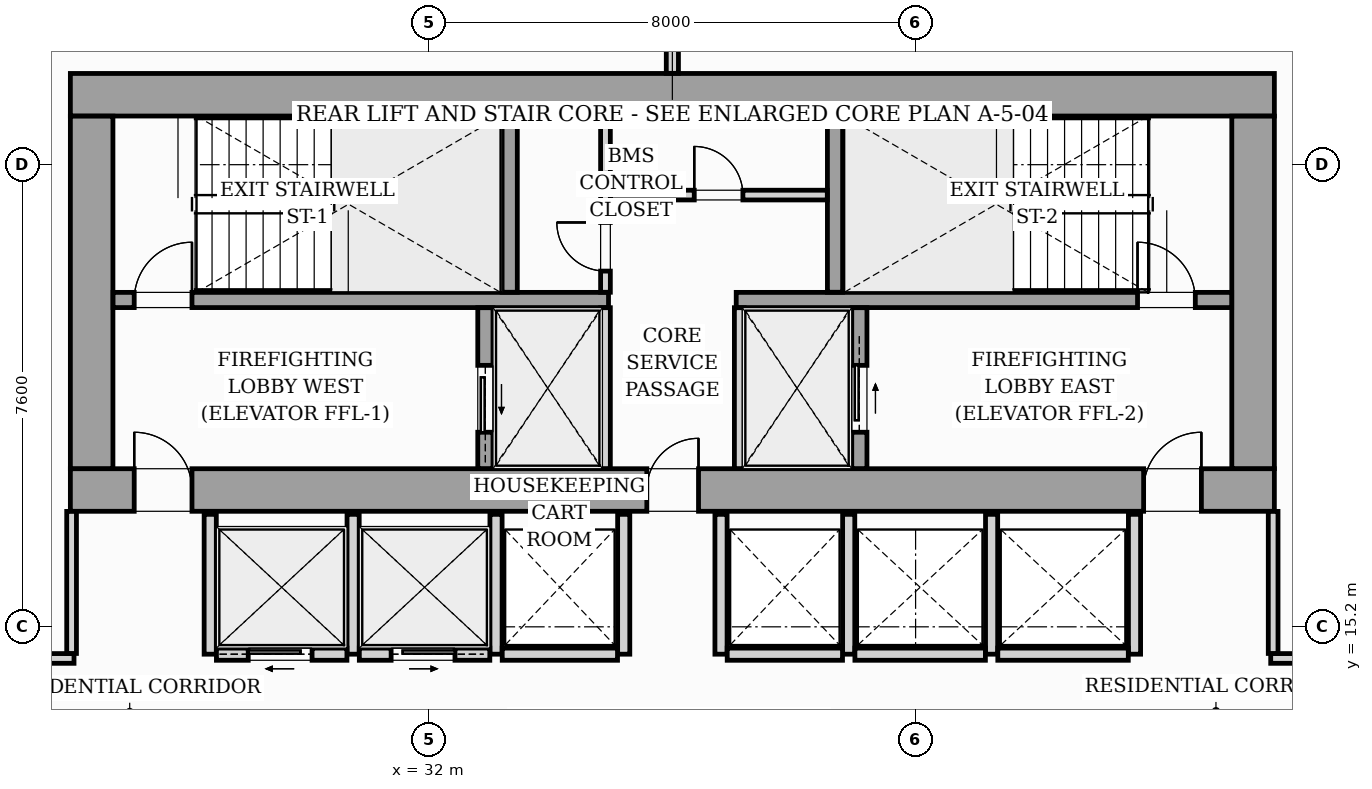
"""IFC4 building model, lengths in metres.
Left out: names, types, materials, properties, quantities, classifications, styles, units other than length and angle.
Written with IfcOpenShell. Run it as: python <this file> out.ifc"""

import sys

from ifc_helpers import new_model, si_unit, direction, frame, frame_2d, origin, origin_2d, place, context, subcontext, project, spatial, rectangle, i_section, extrude, source, transform, mapped, element, fill, save


model = new_model("IFC4")
c1 = context("Model", 3, precision=1e-05, world=origin(), true_north=direction((0.0, 1.0)))
c2 = subcontext(c1, "Body", "Model", "MODEL_VIEW")
j1 = project(units=[si_unit("LENGTHUNIT", "METRE"), si_unit("PLANEANGLEUNIT", "RADIAN")], contexts=[c1])
p1 = place(None, origin())
s1 = spatial("IfcSite", under=j1, at=p1, CompositionType="ELEMENT")
p2 = place(p1, origin())
s2 = spatial("IfcBuilding", under=s1, at=p2, CompositionType="ELEMENT")
p3 = place(p2, frame((0.0, 0.0, 90.6)))
s3 = spatial("IfcBuildingStorey", under=s2, at=p3, CompositionType="ELEMENT", Elevation=90.6)
m1 = source(origin(), c2, "Body", "SweptSolid", [
    extrude(i_section(OverallWidth=0.427, OverallDepth=0.483, WebThickness=0.051, FlangeThickness=0.082, FilletRadius=0.018, at=origin_2d()), origin(), (0.0, 0.0, 1.0), 3.196),
])
for number, where, z_axis, x_axis in (
    (1, (26.4, 17.4, 0.002), (0.0, 0.0, 1.0), (1.0, 0.0, 0.0)),
    (2, (33.12, 17.4, 0.002), (0.0, 0.0, 1.0), (1.0, 0.0, 0.0)),
    (3, (38.88, 17.4, 0.002), (0.0, 0.0, 1.0), (1.0, 0.0, 0.0)),
    (4, (45.6, 17.4, 0.002), (0.0, 0.0, 1.0), (1.0, 0.0, 0.0)),
    (5, (26.4, 24.0, 0.002), (0.0, 0.0, 1.0), (1.0, 0.0, 0.0)),
    (6, (33.12, 24.0, 0.002), (0.0, 0.0, 1.0), (1.0, 0.0, 0.0)),
    (7, (38.88, 24.0, 0.002), (0.0, 0.0, 1.0), (1.0, 0.0, 0.0)),
    (8, (45.6, 24.0, 0.002), (0.0, 0.0, 1.0), (1.0, 0.0, 0.0)),
):
    element("IfcColumn", number, at=place(p3, frame(where, z_axis=z_axis, x_axis=x_axis)), inside=s3, PredefinedType="PILASTER", context=c2, shape_type="MappedRepresentation", body=[
        mapped(m1, transform((0.0, 0.0, 0.0), scale=1.0)),
    ])
p4 = place(p3, frame((11.08, 23.508, 0.0), z_axis=(0.0, 0.0, 1.0), x_axis=(0.995396638587, 0.095841180552, 0.0)))
e9 = element("IfcWall", 9, at=p4, inside=s3, PredefinedType="STANDARD", context=c2, shape_type="SweptSolid", body=[
    extrude(rectangle(XDim=19.11, YDim=0.26, at=frame_2d((9.555, 0.0))), origin(), (0.0, 0.0, 1.0), 2.94),
])
p5 = place(p4, frame((8.514, 0.0, 0.0)))
e10 = element("IfcOpeningElement", 10, at=p5, cuts=e9, PredefinedType="OPENING", context=c2, shape_type="SweptSolid", body=[
    extrude(rectangle(XDim=1.8, YDim=2.06, at=frame_2d((0.9, 1.03))), frame((0.0, 0.14, 0.0), z_axis=(0.0, -1.0, 0.0), x_axis=(1.0, 0.0, 0.0)), (0.0, 0.0, 1.0), 0.28),
])
p6 = place(p4, frame((2.05, 0.0, 0.65)))
e11 = element("IfcOpeningElement", 11, at=p6, cuts=e9, PredefinedType="OPENING", context=c2, shape_type="SweptSolid", body=[
    extrude(rectangle(XDim=1.6, YDim=1.5, at=frame_2d((0.8, 0.75))), frame((0.0, 0.14, 0.0), z_axis=(0.0, -1.0, 0.0), x_axis=(1.0, 0.0, 0.0)), (0.0, 0.0, 1.0), 0.28),
])
p7 = place(p3, frame((26.1, 17.45, 0.0), z_axis=(0.0, 0.0, 1.0), x_axis=(1.0, 0.0, 0.0)))
e12 = element("IfcWall", 12, at=p7, inside=s3, PredefinedType="SHEAR", context=c2, shape_type="SweptSolid", body=[
    extrude(rectangle(XDim=19.8, YDim=0.7, at=frame_2d((9.9, 0.0))), origin(), (0.0, 0.0, 1.0), 3.2),
])
p8 = place(p7, frame((1.05, 0.0, 0.0)))
e13 = element("IfcOpeningElement", 13, at=p8, cuts=e12, PredefinedType="OPENING", context=c2, shape_type="SweptSolid", body=[
    extrude(rectangle(XDim=0.95, YDim=2.06, at=frame_2d((0.475, 1.03))), frame((0.0, 0.36, 0.0), z_axis=(0.0, -1.0, 0.0), x_axis=(1.0, 0.0, 0.0)), (0.0, 0.0, 1.0), 0.72),
])
p9 = place(p7, frame((9.48, 0.0, 0.0)))
e14 = element("IfcOpeningElement", 14, at=p9, cuts=e12, PredefinedType="OPENING", context=c2, shape_type="SweptSolid", body=[
    extrude(rectangle(XDim=0.85, YDim=2.0, at=frame_2d((0.425, 1.0))), frame((0.0, 0.36, 0.0), z_axis=(0.0, -1.0, 0.0), x_axis=(1.0, 0.0, 0.0)), (0.0, 0.0, 1.0), 0.72),
])
p10 = place(p7, frame((17.65, 0.0, 0.0)))
e15 = element("IfcOpeningElement", 15, at=p10, cuts=e12, PredefinedType="OPENING", context=c2, shape_type="SweptSolid", body=[
    extrude(rectangle(XDim=0.95, YDim=2.06, at=frame_2d((0.475, 1.03))), frame((0.0, 0.36, 0.0), z_axis=(0.0, -1.0, 0.0), x_axis=(1.0, 0.0, 0.0)), (0.0, 0.0, 1.0), 0.72),
])
p11 = place(p3, frame((26.1, 23.95, 0.0), z_axis=(0.0, 0.0, 1.0), x_axis=(1.0, 0.0, 0.0)))
e16 = element("IfcWall", 16, at=p11, inside=s3, PredefinedType="SHEAR", context=c2, shape_type="SweptSolid", body=[
    extrude(rectangle(XDim=19.8, YDim=0.7, at=frame_2d((9.9, 0.0))), origin(), (0.0, 0.0, 1.0), 3.2),
])
for number, where, z_axis, x_axis in (
    (17, (26.45, 17.802, 0.0), (0.0, 0.0, 1.0), (0.0, 1.0, 0.0)),
    (18, (45.55, 17.802, 0.0), (0.0, 0.0, 1.0), (0.0, 1.0, 0.0)),
):
    element("IfcWall", number, at=place(p3, frame(where, z_axis=z_axis, x_axis=x_axis)), inside=s3, PredefinedType="SHEAR", context=c2, shape_type="SweptSolid", body=[
        extrude(rectangle(XDim=5.796, YDim=0.7, at=frame_2d((2.898, 0.0))), origin(), (0.0, 0.0, 1.0), 3.2),
    ])
p12 = place(p3, frame((26.802, 20.575, 0.0), z_axis=(0.0, 0.0, 1.0), x_axis=(1.0, 0.0, 0.0)))
e19 = element("IfcWall", 19, at=p12, inside=s3, PredefinedType="SOLIDWALL", context=c2, shape_type="SweptSolid", body=[
    extrude(rectangle(XDim=8.148, YDim=0.25, at=frame_2d((4.074, 0.0))), origin(), (0.0, 0.0, 1.0), 3.2),
])
p13 = place(p12, frame((0.348, 0.0, 0.0)))
e20 = element("IfcOpeningElement", 20, at=p13, cuts=e19, PredefinedType="OPENING", context=c2, shape_type="SweptSolid", body=[
    extrude(rectangle(XDim=0.95, YDim=2.06, at=frame_2d((0.475, 1.03))), frame((0.0, 0.135, 0.0), z_axis=(0.0, -1.0, 0.0), x_axis=(1.0, 0.0, 0.0)), (0.0, 0.0, 1.0), 0.27),
])
p14 = place(p3, frame((37.05, 20.575, 0.0), z_axis=(0.0, 0.0, 1.0), x_axis=(1.0, 0.0, 0.0)))
e21 = element("IfcWall", 21, at=p14, inside=s3, PredefinedType="SOLIDWALL", context=c2, shape_type="SweptSolid", body=[
    extrude(rectangle(XDim=8.148, YDim=0.25, at=frame_2d((4.074, 0.0))), origin(), (0.0, 0.0, 1.0), 3.2),
])
p15 = place(p14, frame((6.6, 0.0, 0.0)))
e22 = element("IfcOpeningElement", 22, at=p15, cuts=e21, PredefinedType="OPENING", context=c2, shape_type="SweptSolid", body=[
    extrude(rectangle(XDim=0.95, YDim=2.06, at=frame_2d((0.475, 1.03))), frame((0.0, 0.135, 0.0), z_axis=(0.0, -1.0, 0.0), x_axis=(1.0, 0.0, 0.0)), (0.0, 0.0, 1.0), 0.27),
])
for number, where, z_axis, x_axis in (
    (23, (33.325, 20.702, 0.0), (0.0, 0.0, 1.0), (0.0, 1.0, 0.0)),
    (24, (38.675, 20.702, 0.0), (0.0, 0.0, 1.0), (0.0, 1.0, 0.0)),
):
    element("IfcWall", number, at=place(p3, frame(where, z_axis=z_axis, x_axis=x_axis)), inside=s3, PredefinedType="SOLIDWALL", context=c2, shape_type="SweptSolid", body=[
        extrude(rectangle(XDim=2.896, YDim=0.25, at=frame_2d((1.448, 0.0))), origin(), (0.0, 0.0, 1.0), 3.2),
    ])
p16 = place(p3, frame((32.925, 17.802, 0.0), z_axis=(0.0, 0.0, 1.0), x_axis=(0.0, 1.0, 0.0)))
e25 = element("IfcWall", 25, at=p16, inside=s3, PredefinedType="SOLIDWALL", context=c2, shape_type="SweptSolid", body=[
    extrude(rectangle(XDim=2.646, YDim=0.25, at=frame_2d((1.323, 0.0))), origin(), (0.0, 0.0, 1.0), 3.2),
])
p17 = place(p16, frame((0.598, 0.0, 0.0)))
e26 = element("IfcOpeningElement", 26, at=p17, cuts=e25, PredefinedType="OPENING", context=c2, shape_type="SweptSolid", body=[
    extrude(rectangle(XDim=1.1, YDim=2.08, at=frame_2d((0.55, 1.04))), frame((0.0, 0.135, 0.0), z_axis=(0.0, -1.0, 0.0), x_axis=(1.0, 0.0, 0.0)), (0.0, 0.0, 1.0), 0.27),
])
for number, where, z_axis, x_axis in (
    (27, (34.9, 17.802, 0.0), (0.0, 0.0, 1.0), (0.0, 1.0, 0.0)),
    (28, (37.1, 17.802, 0.0), (0.0, 0.0, 1.0), (0.0, 1.0, 0.0)),
):
    element("IfcWall", number, at=place(p3, frame(where, z_axis=z_axis, x_axis=x_axis)), inside=s3, PredefinedType="PARTITIONING", context=c2, shape_type="SweptSolid", body=[
        extrude(rectangle(XDim=2.646, YDim=0.16, at=frame_2d((1.323, 0.0))), origin(), (0.0, 0.0, 1.0), 2.94),
    ])
p18 = place(p3, frame((39.075, 17.802, 0.0), z_axis=(0.0, 0.0, 1.0), x_axis=(0.0, 1.0, 0.0)))
e29 = element("IfcWall", 29, at=p18, inside=s3, PredefinedType="SOLIDWALL", context=c2, shape_type="SweptSolid", body=[
    extrude(rectangle(XDim=2.646, YDim=0.25, at=frame_2d((1.323, 0.0))), origin(), (0.0, 0.0, 1.0), 3.2),
])
p19 = place(p18, frame((0.598, 0.0, 0.0)))
e30 = element("IfcOpeningElement", 30, at=p19, cuts=e29, PredefinedType="OPENING", context=c2, shape_type="SweptSolid", body=[
    extrude(rectangle(XDim=1.1, YDim=2.08, at=frame_2d((0.55, 1.04))), frame((0.0, 0.135, 0.0), z_axis=(0.0, -1.0, 0.0), x_axis=(1.0, 0.0, 0.0)), (0.0, 0.0, 1.0), 0.27),
])
p20 = place(p3, frame((34.9, 20.702, 0.0), z_axis=(0.0, 0.0, 1.0), x_axis=(0.0, 1.0, 0.0)))
e31 = element("IfcWall", 31, at=p20, inside=s3, PredefinedType="PARTITIONING", context=c2, shape_type="SweptSolid", body=[
    extrude(rectangle(XDim=2.896, YDim=0.16, at=frame_2d((1.448, 0.0))), origin(), (0.0, 0.0, 1.0), 2.94),
])
p21 = place(p20, frame((0.348, 0.0, 0.0)))
e32 = element("IfcOpeningElement", 32, at=p21, cuts=e31, PredefinedType="OPENING", context=c2, shape_type="SweptSolid", body=[
    extrude(rectangle(XDim=0.8, YDim=2.05, at=frame_2d((0.4, 1.025))), frame((0.0, 0.09, 0.0), z_axis=(0.0, -1.0, 0.0), x_axis=(1.0, 0.0, 0.0)), (0.0, 0.0, 1.0), 0.18),
])
p22 = place(p3, frame((34.982, 22.3, 0.0), z_axis=(0.0, 0.0, 1.0), x_axis=(1.0, 0.0, 0.0)))
e33 = element("IfcWall", 33, at=p22, inside=s3, PredefinedType="PARTITIONING", context=c2, shape_type="SweptSolid", body=[
    extrude(rectangle(XDim=3.566, YDim=0.16, at=frame_2d((1.783, 0.0))), origin(), (0.0, 0.0, 1.0), 2.94),
])
p23 = place(p22, frame((1.378, 0.0, 0.0)))
e34 = element("IfcOpeningElement", 34, at=p23, cuts=e33, PredefinedType="OPENING", context=c2, shape_type="SweptSolid", body=[
    extrude(rectangle(XDim=0.8, YDim=2.05, at=frame_2d((0.4, 1.025))), frame((0.0, 0.09, 0.0), z_axis=(0.0, -1.0, 0.0), x_axis=(1.0, 0.0, 0.0)), (0.0, 0.0, 1.0), 0.18),
])
for number, where, z_axis, x_axis in (
    (35, (28.4, 14.75, 0.0), (0.0, 0.0, 1.0), (0.0, 1.0, 0.0)),
    (36, (30.75, 14.75, 0.0), (0.0, 0.0, 1.0), (0.0, 1.0, 0.0)),
    (37, (33.1, 14.75, 0.0), (0.0, 0.0, 1.0), (0.0, 1.0, 0.0)),
):
    element("IfcWall", number, at=place(p3, frame(where, z_axis=z_axis, x_axis=x_axis)), inside=s3, PredefinedType="PARTITIONING", context=c2, shape_type="SweptSolid", body=[
        extrude(rectangle(XDim=2.3, YDim=0.2, at=frame_2d((1.15, 0.0))), origin(), (0.0, 0.0, 1.0), 2.94),
    ])
p24 = place(p3, frame((28.502, 14.75, 0.0), z_axis=(0.0, 0.0, 1.0), x_axis=(1.0, 0.0, 0.0)))
e38 = element("IfcWall", 38, at=p24, inside=s3, PredefinedType="PARTITIONING", context=c2, shape_type="SweptSolid", body=[
    extrude(rectangle(XDim=2.146, YDim=0.2, at=frame_2d((1.073, 0.0))), origin(), (0.0, 0.0, 1.0), 2.94),
])
p25 = place(p24, frame((0.523, 0.0, 0.0)))
e39 = element("IfcOpeningElement", 39, at=p25, cuts=e38, PredefinedType="OPENING", context=c2, shape_type="SweptSolid", body=[
    extrude(rectangle(XDim=1.05, YDim=2.08, at=frame_2d((0.525, 1.04))), frame((0.0, 0.11, 0.0), z_axis=(0.0, -1.0, 0.0), x_axis=(1.0, 0.0, 0.0)), (0.0, 0.0, 1.0), 0.22),
])
p26 = place(p3, frame((30.852, 14.75, 0.0), z_axis=(0.0, 0.0, 1.0), x_axis=(1.0, 0.0, 0.0)))
e40 = element("IfcWall", 40, at=p26, inside=s3, PredefinedType="PARTITIONING", context=c2, shape_type="SweptSolid", body=[
    extrude(rectangle(XDim=2.146, YDim=0.2, at=frame_2d((1.073, 0.0))), origin(), (0.0, 0.0, 1.0), 2.94),
])
p27 = place(p26, frame((0.523, 0.0, 0.0)))
e41 = element("IfcOpeningElement", 41, at=p27, cuts=e40, PredefinedType="OPENING", context=c2, shape_type="SweptSolid", body=[
    extrude(rectangle(XDim=1.05, YDim=2.08, at=frame_2d((0.525, 1.04))), frame((0.0, 0.11, 0.0), z_axis=(0.0, -1.0, 0.0), x_axis=(1.0, 0.0, 0.0)), (0.0, 0.0, 1.0), 0.22),
])
p28 = place(p3, frame((35.2, 14.75, 0.0), z_axis=(0.0, 0.0, 1.0), x_axis=(0.0, 1.0, 0.0)))
e42 = element("IfcWall", 42, at=p28, inside=s3, PredefinedType="PARTITIONING", context=c2, shape_type="SweptSolid", body=[
    extrude(rectangle(XDim=2.3, YDim=0.2, at=frame_2d((1.15, 0.0))), origin(), (0.0, 0.0, 1.0), 2.94),
])
p29 = place(p3, frame((33.202, 14.75, 0.0), z_axis=(0.0, 0.0, 1.0), x_axis=(1.0, 0.0, 0.0)))
e43 = element("IfcWall", 43, at=p29, inside=s3, PredefinedType="PARTITIONING", context=c2, shape_type="SweptSolid", body=[
    extrude(rectangle(XDim=1.896, YDim=0.2, at=frame_2d((0.948, 0.0))), origin(), (0.0, 0.0, 1.0), 2.94),
])
for number, where, z_axis, x_axis in (
    (44, (36.8, 14.75, 0.0), (0.0, 0.0, 1.0), (0.0, 1.0, 0.0)),
    (45, (38.9, 14.75, 0.0), (0.0, 0.0, 1.0), (0.0, 1.0, 0.0)),
):
    element("IfcWall", number, at=place(p3, frame(where, z_axis=z_axis, x_axis=x_axis)), inside=s3, PredefinedType="PARTITIONING", context=c2, shape_type="SweptSolid", body=[
        extrude(rectangle(XDim=2.3, YDim=0.2, at=frame_2d((1.15, 0.0))), origin(), (0.0, 0.0, 1.0), 2.94),
    ])
p30 = place(p3, frame((36.902, 14.75, 0.0), z_axis=(0.0, 0.0, 1.0), x_axis=(1.0, 0.0, 0.0)))
e46 = element("IfcWall", 46, at=p30, inside=s3, PredefinedType="PARTITIONING", context=c2, shape_type="SweptSolid", body=[
    extrude(rectangle(XDim=1.896, YDim=0.2, at=frame_2d((0.948, 0.0))), origin(), (0.0, 0.0, 1.0), 2.94),
])
for number, where, z_axis, x_axis in (
    (47, (41.25, 14.75, 0.0), (0.0, 0.0, 1.0), (0.0, 1.0, 0.0)),
    (48, (43.6, 14.75, 0.0), (0.0, 0.0, 1.0), (0.0, 1.0, 0.0)),
):
    element("IfcWall", number, at=place(p3, frame(where, z_axis=z_axis, x_axis=x_axis)), inside=s3, PredefinedType="PARTITIONING", context=c2, shape_type="SweptSolid", body=[
        extrude(rectangle(XDim=2.3, YDim=0.2, at=frame_2d((1.15, 0.0))), origin(), (0.0, 0.0, 1.0), 2.94),
    ])
for number, where, z_axis, x_axis in (
    (49, (39.002, 14.75, 0.0), (0.0, 0.0, 1.0), (1.0, 0.0, 0.0)),
    (50, (41.352, 14.75, 0.0), (0.0, 0.0, 1.0), (1.0, 0.0, 0.0)),
):
    element("IfcWall", number, at=place(p3, frame(where, z_axis=z_axis, x_axis=x_axis)), inside=s3, PredefinedType="PARTITIONING", context=c2, shape_type="SweptSolid", body=[
        extrude(rectangle(XDim=2.146, YDim=0.2, at=frame_2d((1.073, 0.0))), origin(), (0.0, 0.0, 1.0), 2.94),
    ])
p31 = place(p3, frame((36.0, 24.302, 0.0), z_axis=(0.0, 0.0, 1.0), x_axis=(0.0, 1.0, 0.0)))
e51 = element("IfcWall", 51, at=p31, inside=s3, PredefinedType="PARTITIONING", context=c2, shape_type="SweptSolid", body=[
    extrude(rectangle(XDim=1.656, YDim=0.2, at=frame_2d((0.828, 0.0))), origin(), (0.0, 0.0, 1.0), 2.94),
])
p32 = place(p3, frame((19.732, 14.68, 0.0), z_axis=(0.0, 0.0, 1.0), x_axis=(1.0, 0.0, 0.0)))
e52 = element("IfcWall", 52, at=p32, inside=s3, PredefinedType="PARTITIONING", context=c2, shape_type="SweptSolid", body=[
    extrude(rectangle(XDim=6.428, YDim=0.16, at=frame_2d((3.214, 0.0))), origin(), (0.0, 0.0, 1.0), 2.94),
])
p33 = place(p32, frame((2.638, 0.0, 0.0)))
e53 = element("IfcOpeningElement", 53, at=p33, cuts=e52, PredefinedType="OPENING", context=c2, shape_type="SweptSolid", body=[
    extrude(rectangle(XDim=0.95, YDim=2.06, at=frame_2d((0.475, 1.03))), frame((0.0, 0.09, 0.0), z_axis=(0.0, -1.0, 0.0), x_axis=(1.0, 0.0, 0.0)), (0.0, 0.0, 1.0), 0.18),
])
p34 = place(p3, frame((26.12, 14.762, 0.0), z_axis=(0.0, 0.0, 1.0), x_axis=(0.0, 1.0, 0.0)))
e54 = element("IfcWall", 54, at=p34, inside=s3, PredefinedType="PARTITIONING", context=c2, shape_type="SweptSolid", body=[
    extrude(rectangle(XDim=2.336, YDim=0.16, at=frame_2d((1.168, 0.0))), origin(), (0.0, 0.0, 1.0), 2.94),
])
p35 = place(p3, frame((45.84, 14.68, 0.0), z_axis=(0.0, 0.0, 1.0), x_axis=(1.0, 0.0, 0.0)))
e55 = element("IfcWall", 55, at=p35, inside=s3, PredefinedType="PARTITIONING", context=c2, shape_type="SweptSolid", body=[
    extrude(rectangle(XDim=7.178, YDim=0.16, at=frame_2d((3.589, 0.0))), origin(), (0.0, 0.0, 1.0), 2.94),
])
p36 = place(p35, frame((3.215, 0.0, 0.0)))
e56 = element("IfcOpeningElement", 56, at=p36, cuts=e55, PredefinedType="OPENING", context=c2, shape_type="SweptSolid", body=[
    extrude(rectangle(XDim=0.95, YDim=2.06, at=frame_2d((0.475, 1.03))), frame((0.0, 0.09, 0.0), z_axis=(0.0, -1.0, 0.0), x_axis=(1.0, 0.0, 0.0)), (0.0, 0.0, 1.0), 0.18),
])
p37 = place(p3, frame((45.88, 14.762, 0.0), z_axis=(0.0, 0.0, 1.0), x_axis=(0.0, 1.0, 0.0)))
e57 = element("IfcWall", 57, at=p37, inside=s3, PredefinedType="PARTITIONING", context=c2, shape_type="SweptSolid", body=[
    extrude(rectangle(XDim=2.336, YDim=0.16, at=frame_2d((1.168, 0.0))), origin(), (0.0, 0.0, 1.0), 2.94),
])
m2 = source(origin(), c2, "Body", "SweptSolid", [
    extrude(rectangle(XDim=0.95, YDim=2.06, at=frame_2d((0.475, 1.03))), frame((0.0, 0.025, 0.0), z_axis=(0.0, -1.0, 0.0), x_axis=(1.0, 0.0, 0.0)), (0.0, 0.0, 1.0), 0.05),
])
p38 = place(p8, origin())
e58 = element("IfcDoor", 58, at=p38, inside=s3, OperationType="SINGLE_SWING_LEFT", PredefinedType="DOOR", context=c2, shape_type="MappedRepresentation", body=[
    mapped(m2, transform((0.0, 0.0, 0.0), scale=1.0)),
])
fill(e13, e58)
m3 = source(origin(), c2, "Body", "SweptSolid", [
    extrude(rectangle(XDim=0.85, YDim=2.0, at=frame_2d((0.425, 1.0))), frame((0.0, 0.025, 0.0), z_axis=(0.0, -1.0, 0.0), x_axis=(1.0, 0.0, 0.0)), (0.0, 0.0, 1.0), 0.05),
])
p39 = place(p9, origin())
e59 = element("IfcDoor", 59, at=p39, inside=s3, OperationType="SINGLE_SWING_RIGHT", PredefinedType="DOOR", context=c2, shape_type="MappedRepresentation", body=[
    mapped(m3, transform((0.0, 0.0, 0.0), scale=1.0)),
])
fill(e14, e59)
p40 = place(p10, origin())
e60 = element("IfcDoor", 60, at=p40, inside=s3, OperationType="SINGLE_SWING_RIGHT", PredefinedType="DOOR", context=c2, shape_type="MappedRepresentation", body=[
    mapped(m2, transform((0.0, 0.0, 0.0), scale=1.0)),
])
fill(e15, e60)
p41 = place(p13, origin())
e61 = element("IfcDoor", 61, at=p41, inside=s3, OperationType="SINGLE_SWING_RIGHT", PredefinedType="DOOR", context=c2, shape_type="MappedRepresentation", body=[
    mapped(m2, transform((0.0, 0.0, 0.0), scale=1.0)),
])
fill(e20, e61)
p42 = place(p15, origin())
e62 = element("IfcDoor", 62, at=p42, inside=s3, OperationType="SINGLE_SWING_LEFT", PredefinedType="DOOR", context=c2, shape_type="MappedRepresentation", body=[
    mapped(m2, transform((0.0, 0.0, 0.0), scale=1.0)),
])
fill(e22, e62)
m4 = source(origin(), c2, "Body", "SweptSolid", [
    extrude(rectangle(XDim=1.1, YDim=2.08, at=frame_2d((0.55, 1.04))), frame((0.0, 0.025, 0.0), z_axis=(0.0, -1.0, 0.0), x_axis=(1.0, 0.0, 0.0)), (0.0, 0.0, 1.0), 0.05),
])
p43 = place(p17, origin())
e63 = element("IfcDoor", 63, at=p43, inside=s3, OperationType="SLIDING_TO_LEFT", PredefinedType="DOOR", context=c2, shape_type="MappedRepresentation", body=[
    mapped(m4, transform((0.0, 0.0, 0.0), scale=1.0)),
])
fill(e26, e63)
p44 = place(p19, origin())
e64 = element("IfcDoor", 64, at=p44, inside=s3, OperationType="SLIDING_TO_RIGHT", PredefinedType="DOOR", context=c2, shape_type="MappedRepresentation", body=[
    mapped(m4, transform((0.0, 0.0, 0.0), scale=1.0)),
])
fill(e30, e64)
m5 = source(origin(), c2, "Body", "SweptSolid", [
    extrude(rectangle(XDim=0.8, YDim=2.05, at=frame_2d((0.4, 1.025))), frame((0.0, 0.025, 0.0), z_axis=(0.0, -1.0, 0.0), x_axis=(1.0, 0.0, 0.0)), (0.0, 0.0, 1.0), 0.05),
])
p45 = place(p21, origin())
e65 = element("IfcDoor", 65, at=p45, inside=s3, OperationType="SINGLE_SWING_RIGHT", PredefinedType="DOOR", context=c2, shape_type="MappedRepresentation", body=[
    mapped(m5, transform((0.0, 0.0, 0.0), scale=1.0)),
])
fill(e32, e65)
p46 = place(p23, origin())
e66 = element("IfcDoor", 66, at=p46, inside=s3, OperationType="SINGLE_SWING_LEFT", PredefinedType="DOOR", context=c2, shape_type="MappedRepresentation", body=[
    mapped(m5, transform((0.0, 0.0, 0.0), scale=1.0)),
])
fill(e34, e66)
m6 = source(origin(), c2, "Body", "SweptSolid", [
    extrude(rectangle(XDim=1.05, YDim=2.08, at=frame_2d((0.525, 1.04))), frame((0.0, 0.025, 0.0), z_axis=(0.0, -1.0, 0.0), x_axis=(1.0, 0.0, 0.0)), (0.0, 0.0, 1.0), 0.05),
])
p47 = place(p25, origin())
e67 = element("IfcDoor", 67, at=p47, inside=s3, OperationType="SLIDING_TO_LEFT", PredefinedType="DOOR", context=c2, shape_type="MappedRepresentation", body=[
    mapped(m6, transform((0.0, 0.0, 0.0), scale=1.0)),
])
fill(e39, e67)
p48 = place(p27, origin())
e68 = element("IfcDoor", 68, at=p48, inside=s3, OperationType="SLIDING_TO_RIGHT", PredefinedType="DOOR", context=c2, shape_type="MappedRepresentation", body=[
    mapped(m6, transform((0.0, 0.0, 0.0), scale=1.0)),
])
fill(e41, e68)
save(model, sys.argv[1])
